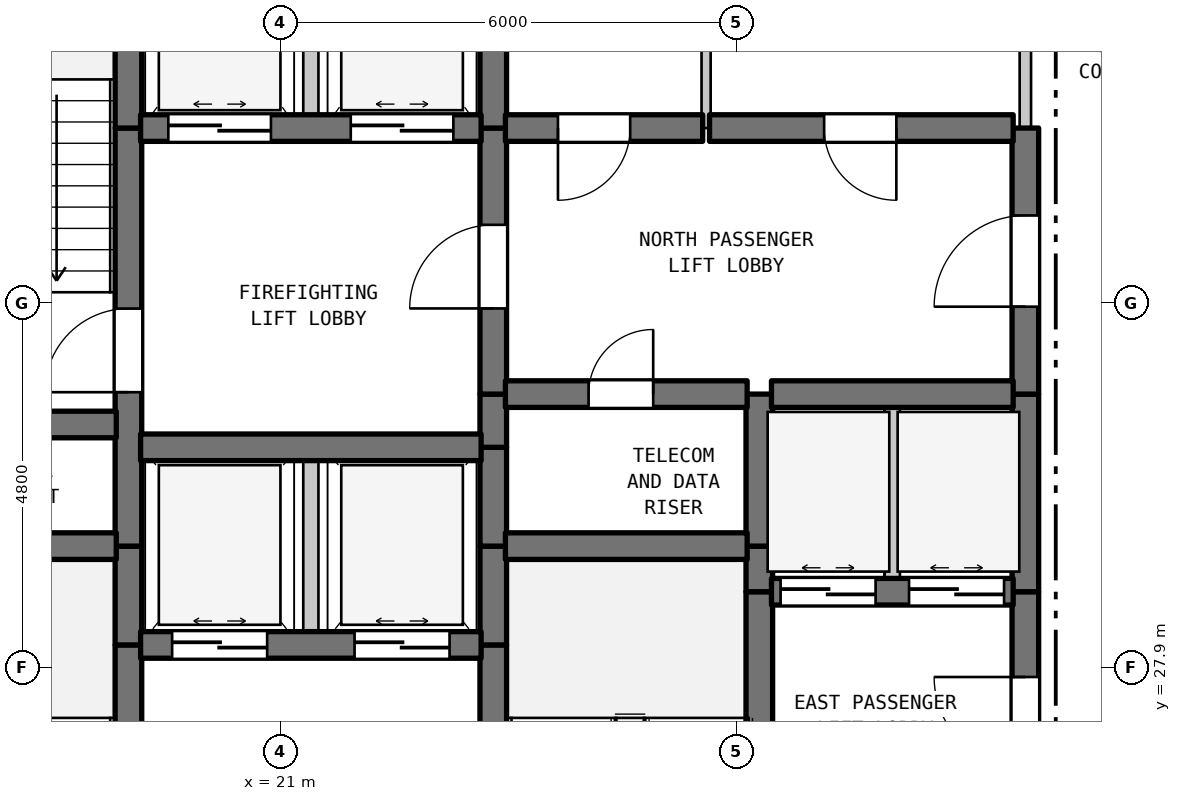
"""IFC4 building model, lengths in metres.
Left out: names, types, materials, properties, quantities, classifications, styles, units other than length and angle.
Written with IfcOpenShell. Run it as: python <this file> out.ifc"""

import sys

from ifc_helpers import new_model, si_unit, direction, frame, frame_2d, origin, place, context, subcontext, project, spatial, rectangle, extrude, element, fill, save


model = new_model("IFC4")
c1 = context("Model", 3, precision=1e-05, world=origin(), true_north=direction((0.0, 1.0)))
c2 = subcontext(c1, "Body", "Model", "MODEL_VIEW")
j1 = project(units=[si_unit("LENGTHUNIT", "METRE"), si_unit("PLANEANGLEUNIT", "RADIAN")], contexts=[c1])
p1 = place(None, origin())
s1 = spatial("IfcSite", under=j1, at=p1, CompositionType="ELEMENT")
p2 = place(p1, origin())
s2 = spatial("IfcBuilding", under=s1, at=p2, CompositionType="ELEMENT")
p3 = place(p2, frame((0.0, 0.0, 176.5)))
s3 = spatial("IfcBuildingStorey", under=s2, at=p3, CompositionType="ELEMENT", Elevation=176.5)
p4 = place(p3, frame((19.0, 22.7, 0.0), z_axis=(0.0, 0.0, 1.0), x_axis=(0.0, 1.0, 0.0)))
e1 = element("IfcWall", 1, at=p4, inside=s3, PredefinedType="SHEAR", context=c2, shape_type="SweptSolid", body=[
    extrude(rectangle(XDim=5.5, YDim=0.35, at=frame_2d((2.75, 0.0))), origin(), (0.0, 0.0, 1.0), 3.39),
])
p5 = place(p4, frame((0.631, 0.0, 0.0)))
e2 = element("IfcOpeningElement", 2, at=p5, cuts=e1, PredefinedType="OPENING", context=c2, shape_type="SweptSolid", body=[
    extrude(rectangle(XDim=1.1, YDim=2.15, at=frame_2d((0.55, 1.075))), frame((0.0, 0.185, 0.0), z_axis=(0.0, -1.0, 0.0), x_axis=(1.0, 0.0, 0.0)), (0.0, 0.0, 1.0), 0.37),
])
p6 = place(p3, frame((19.0, 28.2, 0.0), z_axis=(0.0, 0.0, 1.0), x_axis=(0.0, 1.0, 0.0)))
e3 = element("IfcWall", 3, at=p6, inside=s3, PredefinedType="SHEAR", context=c2, shape_type="SweptSolid", body=[
    extrude(rectangle(XDim=1.3, YDim=0.35, at=frame_2d((0.65, 0.0))), origin(), (0.0, 0.0, 1.0), 3.39),
])
p7 = place(p3, frame((19.0, 29.5, 0.0), z_axis=(0.0, 0.0, 1.0), x_axis=(0.0, 1.0, 0.0)))
e4 = element("IfcWall", 4, at=p7, inside=s3, PredefinedType="SHEAR", context=c2, shape_type="SweptSolid", body=[
    extrude(rectangle(XDim=5.5, YDim=0.35, at=frame_2d((2.75, 0.0))), origin(), (0.0, 0.0, 1.0), 3.39),
])
p8 = place(p7, frame((2.025, 0.0, 0.0)))
e5 = element("IfcOpeningElement", 5, at=p8, cuts=e4, PredefinedType="OPENING", context=c2, shape_type="SweptSolid", body=[
    extrude(rectangle(XDim=1.1, YDim=2.15, at=frame_2d((0.55, 1.075))), frame((0.0, 0.185, 0.0), z_axis=(0.0, -1.0, 0.0), x_axis=(1.0, 0.0, 0.0)), (0.0, 0.0, 1.0), 0.37),
])
p9 = place(p3, frame((19.0, 35.0, 0.0), z_axis=(0.0, 0.0, 1.0), x_axis=(0.0, 1.0, 0.0)))
e6 = element("IfcWall", 6, at=p9, inside=s3, PredefinedType="SHEAR", context=c2, shape_type="SweptSolid", body=[
    extrude(rectangle(XDim=2.9, YDim=0.35, at=frame_2d((1.45, 0.0))), origin(), (0.0, 0.0, 1.0), 3.39),
])
p10 = place(p3, frame((21.4, 28.2, 0.0), z_axis=(0.0, 0.0, 1.0), x_axis=(0.0, 1.0, 0.0)))
e7 = element("IfcWall", 7, at=p10, inside=s3, PredefinedType="STANDARD", context=c2, shape_type="SweptSolid", body=[
    extrude(rectangle(XDim=2.6, YDim=0.2, at=frame_2d((1.3, 0.0))), origin(), (0.0, 0.0, 1.0), 3.39),
])
p11 = place(p3, frame((21.4, 35.0, 0.0), z_axis=(0.0, 0.0, 1.0), x_axis=(0.0, 1.0, 0.0)))
e8 = element("IfcWall", 8, at=p11, inside=s3, PredefinedType="STANDARD", context=c2, shape_type="SweptSolid", body=[
    extrude(rectangle(XDim=2.9, YDim=0.2, at=frame_2d((1.45, 0.0))), origin(), (0.0, 0.0, 1.0), 3.39),
])
p12 = place(p3, frame((23.8, 22.7, 0.0), z_axis=(0.0, 0.0, 1.0), x_axis=(0.0, 1.0, 0.0)))
e9 = element("IfcWall", 9, at=p12, inside=s3, PredefinedType="SHEAR", context=c2, shape_type="SweptSolid", body=[
    extrude(rectangle(XDim=5.5, YDim=0.35, at=frame_2d((2.75, 0.0))), origin(), (0.0, 0.0, 1.0), 3.39),
])
p13 = place(p12, frame((0.235, 0.0, 0.0)))
e10 = element("IfcOpeningElement", 10, at=p13, cuts=e9, PredefinedType="OPENING", context=c2, shape_type="SweptSolid", body=[
    extrude(rectangle(XDim=1.1, YDim=2.15, at=frame_2d((0.55, 1.075))), frame((0.0, 0.185, 0.0), z_axis=(0.0, -1.0, 0.0), x_axis=(1.0, 0.0, 0.0)), (0.0, 0.0, 1.0), 0.37),
])
for number, where, z_axis, x_axis in (
    (11, (23.8, 28.2, 0.0), (0.0, 0.0, 1.0), (0.0, 1.0, 0.0)),
    (12, (23.8, 29.5, 0.0), (0.0, 0.0, 1.0), (0.0, 1.0, 0.0)),
):
    element("IfcWall", number, at=place(p3, frame(where, z_axis=z_axis, x_axis=x_axis)), inside=s3, PredefinedType="SHEAR", context=c2, shape_type="SweptSolid", body=[
        extrude(rectangle(XDim=1.3, YDim=0.35, at=frame_2d((0.65, 0.0))), origin(), (0.0, 0.0, 1.0), 3.39),
    ])
p14 = place(p3, frame((23.8, 30.8, 0.0), z_axis=(0.0, 0.0, 1.0), x_axis=(0.0, 1.0, 0.0)))
e13 = element("IfcWall", 13, at=p14, inside=s3, PredefinedType="SHEAR", context=c2, shape_type="SweptSolid", body=[
    extrude(rectangle(XDim=0.7, YDim=0.35, at=frame_2d((0.35, 0.0))), origin(), (0.0, 0.0, 1.0), 3.39),
])
p15 = place(p3, frame((23.8, 31.5, 0.0), z_axis=(0.0, 0.0, 1.0), x_axis=(0.0, 1.0, 0.0)))
e14 = element("IfcWall", 14, at=p15, inside=s3, PredefinedType="SHEAR", context=c2, shape_type="SweptSolid", body=[
    extrude(rectangle(XDim=3.5, YDim=0.35, at=frame_2d((1.75, 0.0))), origin(), (0.0, 0.0, 1.0), 3.39),
])
p16 = place(p15, frame((1.127, 0.0, 0.0)))
e15 = element("IfcOpeningElement", 15, at=p16, cuts=e14, PredefinedType="OPENING", context=c2, shape_type="SweptSolid", body=[
    extrude(rectangle(XDim=1.1, YDim=2.15, at=frame_2d((0.55, 1.075))), frame((0.0, 0.185, 0.0), z_axis=(0.0, -1.0, 0.0), x_axis=(1.0, 0.0, 0.0)), (0.0, 0.0, 1.0), 0.37),
])
p17 = place(p3, frame((23.8, 35.0, 0.0), z_axis=(0.0, 0.0, 1.0), x_axis=(0.0, 1.0, 0.0)))
e16 = element("IfcWall", 16, at=p17, inside=s3, PredefinedType="SHEAR", context=c2, shape_type="SweptSolid", body=[
    extrude(rectangle(XDim=2.9, YDim=0.35, at=frame_2d((1.45, 0.0))), origin(), (0.0, 0.0, 1.0), 3.39),
])
p18 = place(p3, frame((26.6, 35.0, 0.0), z_axis=(0.0, 0.0, 1.0), x_axis=(0.0, 1.0, 0.0)))
e17 = element("IfcWall", 17, at=p18, inside=s3, PredefinedType="PARTITIONING", context=c2, shape_type="SweptSolid", body=[
    extrude(rectangle(XDim=2.9, YDim=0.12, at=frame_2d((1.45, 0.0))), origin(), (0.0, 0.0, 1.0), 3.39),
])
p19 = place(p3, frame((27.3, 25.6, 0.0), z_axis=(0.0, 0.0, 1.0), x_axis=(0.0, 1.0, 0.0)))
e18 = element("IfcWall", 18, at=p19, inside=s3, PredefinedType="SHEAR", context=c2, shape_type="SweptSolid", body=[
    extrude(rectangle(XDim=3.3, YDim=0.35, at=frame_2d((1.65, 0.0))), origin(), (0.0, 0.0, 1.0), 3.39),
])
p20 = place(p3, frame((27.3, 28.9, 0.0), z_axis=(0.0, 0.0, 1.0), x_axis=(0.0, 1.0, 0.0)))
e19 = element("IfcWall", 19, at=p20, inside=s3, PredefinedType="SHEAR", context=c2, shape_type="SweptSolid", body=[
    extrude(rectangle(XDim=0.6, YDim=0.35, at=frame_2d((0.3, 0.0))), origin(), (0.0, 0.0, 1.0), 3.39),
])
p21 = place(p3, frame((27.3, 29.5, 0.0), z_axis=(0.0, 0.0, 1.0), x_axis=(0.0, 1.0, 0.0)))
e20 = element("IfcWall", 20, at=p21, inside=s3, PredefinedType="SHEAR", context=c2, shape_type="SweptSolid", body=[
    extrude(rectangle(XDim=2.0, YDim=0.35, at=frame_2d((1.0, 0.0))), origin(), (0.0, 0.0, 1.0), 3.39),
])
p22 = place(p3, frame((29.05, 28.9, 0.0), z_axis=(0.0, 0.0, 1.0), x_axis=(0.0, 1.0, 0.0)))
e21 = element("IfcWall", 21, at=p22, inside=s3, PredefinedType="STANDARD", context=c2, shape_type="SweptSolid", body=[
    extrude(rectangle(XDim=2.6, YDim=0.2, at=frame_2d((1.3, 0.0))), origin(), (0.0, 0.0, 1.0), 3.39),
])
p23 = place(p3, frame((30.8, 25.6, 0.0), z_axis=(0.0, 0.0, 1.0), x_axis=(0.0, 1.0, 0.0)))
e22 = element("IfcWall", 22, at=p23, inside=s3, PredefinedType="SHEAR", context=c2, shape_type="SweptSolid", body=[
    extrude(rectangle(XDim=3.3, YDim=0.35, at=frame_2d((1.65, 0.0))), origin(), (0.0, 0.0, 1.0), 3.39),
])
p24 = place(p23, frame((0.978, 0.0, 0.0)))
e23 = element("IfcOpeningElement", 23, at=p24, cuts=e22, PredefinedType="OPENING", context=c2, shape_type="SweptSolid", body=[
    extrude(rectangle(XDim=1.2, YDim=2.2, at=frame_2d((0.6, 1.1))), frame((0.0, 0.185, 0.0), z_axis=(0.0, -1.0, 0.0), x_axis=(1.0, 0.0, 0.0)), (0.0, 0.0, 1.0), 0.37),
])
p25 = place(p3, frame((30.8, 28.9, 0.0), z_axis=(0.0, 0.0, 1.0), x_axis=(0.0, 1.0, 0.0)))
e24 = element("IfcWall", 24, at=p25, inside=s3, PredefinedType="SHEAR", context=c2, shape_type="SweptSolid", body=[
    extrude(rectangle(XDim=2.6, YDim=0.35, at=frame_2d((1.3, 0.0))), origin(), (0.0, 0.0, 1.0), 3.39),
])
p26 = place(p3, frame((30.8, 31.5, 0.0), z_axis=(0.0, 0.0, 1.0), x_axis=(0.0, 1.0, 0.0)))
e25 = element("IfcWall", 25, at=p26, inside=s3, PredefinedType="SHEAR", context=c2, shape_type="SweptSolid", body=[
    extrude(rectangle(XDim=3.5, YDim=0.35, at=frame_2d((1.75, 0.0))), origin(), (0.0, 0.0, 1.0), 3.39),
])
p27 = place(p26, frame((1.15, 0.0, 0.0)))
e26 = element("IfcOpeningElement", 26, at=p27, cuts=e25, PredefinedType="OPENING", context=c2, shape_type="SweptSolid", body=[
    extrude(rectangle(XDim=1.2, YDim=2.2, at=frame_2d((0.6, 1.1))), frame((0.0, 0.185, 0.0), z_axis=(0.0, -1.0, 0.0), x_axis=(1.0, 0.0, 0.0)), (0.0, 0.0, 1.0), 0.37),
])
p28 = place(p3, frame((30.8, 35.0, 0.0), z_axis=(0.0, 0.0, 1.0), x_axis=(0.0, 1.0, 0.0)))
e27 = element("IfcWall", 27, at=p28, inside=s3, PredefinedType="STANDARD", context=c2, shape_type="SweptSolid", body=[
    extrude(rectangle(XDim=2.9, YDim=0.15, at=frame_2d((1.45, 0.0))), origin(), (0.0, 0.0, 1.0), 3.39),
])
p29 = place(p3, frame((19.16, 28.2, 0.0), z_axis=(0.0, 0.0, 1.0), x_axis=(1.0, 0.0, 0.0)))
e28 = element("IfcWall", 28, at=p29, inside=s3, PredefinedType="SHEAR", context=c2, shape_type="SweptSolid", body=[
    extrude(rectangle(XDim=4.48, YDim=0.35, at=frame_2d((2.24, 0.0))), origin(), (0.0, 0.0, 1.0), 3.39),
])
p30 = place(p29, frame((0.415, 0.0, 0.0)))
e29 = element("IfcOpeningElement", 29, at=p30, cuts=e28, PredefinedType="OPENING", context=c2, shape_type="SweptSolid", body=[
    extrude(rectangle(XDim=1.25, YDim=2.2, at=frame_2d((0.625, 1.1))), frame((0.0, 0.185, 0.0), z_axis=(0.0, -1.0, 0.0), x_axis=(1.0, 0.0, 0.0)), (0.0, 0.0, 1.0), 0.37),
])
p31 = place(p29, frame((2.815, 0.0, 0.0)))
e30 = element("IfcOpeningElement", 30, at=p31, cuts=e28, PredefinedType="OPENING", context=c2, shape_type="SweptSolid", body=[
    extrude(rectangle(XDim=1.25, YDim=2.2, at=frame_2d((0.625, 1.1))), frame((0.0, 0.185, 0.0), z_axis=(0.0, -1.0, 0.0), x_axis=(1.0, 0.0, 0.0)), (0.0, 0.0, 1.0), 0.37),
])
p32 = place(p3, frame((27.46, 28.9, 0.0), z_axis=(0.0, 0.0, 1.0), x_axis=(1.0, 0.0, 0.0)))
e31 = element("IfcWall", 31, at=p32, inside=s3, PredefinedType="SHEAR", context=c2, shape_type="SweptSolid", body=[
    extrude(rectangle(XDim=3.18, YDim=0.35, at=frame_2d((1.59, 0.0))), origin(), (0.0, 0.0, 1.0), 3.39),
])
p33 = place(p32, frame((0.12, 0.0, 0.0)))
e32 = element("IfcOpeningElement", 32, at=p33, cuts=e31, PredefinedType="OPENING", context=c2, shape_type="SweptSolid", body=[
    extrude(rectangle(XDim=1.25, YDim=2.2, at=frame_2d((0.625, 1.1))), frame((0.0, 0.185, 0.0), z_axis=(0.0, -1.0, 0.0), x_axis=(1.0, 0.0, 0.0)), (0.0, 0.0, 1.0), 0.37),
])
p34 = place(p32, frame((1.81, 0.0, 0.0)))
e33 = element("IfcOpeningElement", 33, at=p34, cuts=e31, PredefinedType="OPENING", context=c2, shape_type="SweptSolid", body=[
    extrude(rectangle(XDim=1.25, YDim=2.2, at=frame_2d((0.625, 1.1))), frame((0.0, 0.185, 0.0), z_axis=(0.0, -1.0, 0.0), x_axis=(1.0, 0.0, 0.0)), (0.0, 0.0, 1.0), 0.37),
])
p35 = place(p3, frame((15.16, 29.5, 0.0), z_axis=(0.0, 0.0, 1.0), x_axis=(1.0, 0.0, 0.0)))
e34 = element("IfcWall", 34, at=p35, inside=s3, PredefinedType="SHEAR", context=c2, shape_type="SweptSolid", body=[
    extrude(rectangle(XDim=3.68, YDim=0.35, at=frame_2d((1.84, 0.0))), origin(), (0.0, 0.0, 1.0), 3.39),
])
p36 = place(p3, frame((23.96, 29.5, 0.0), z_axis=(0.0, 0.0, 1.0), x_axis=(1.0, 0.0, 0.0)))
e35 = element("IfcWall", 35, at=p36, inside=s3, PredefinedType="SHEAR", context=c2, shape_type="SweptSolid", body=[
    extrude(rectangle(XDim=3.18, YDim=0.35, at=frame_2d((1.59, 0.0))), origin(), (0.0, 0.0, 1.0), 3.39),
])
p37 = place(p3, frame((19.16, 30.8, 0.0), z_axis=(0.0, 0.0, 1.0), x_axis=(1.0, 0.0, 0.0)))
e36 = element("IfcWall", 36, at=p37, inside=s3, PredefinedType="SHEAR", context=c2, shape_type="SweptSolid", body=[
    extrude(rectangle(XDim=4.48, YDim=0.35, at=frame_2d((2.24, 0.0))), origin(), (0.0, 0.0, 1.0), 3.39),
])
p38 = place(p3, frame((15.16, 31.1, 0.0), z_axis=(0.0, 0.0, 1.0), x_axis=(1.0, 0.0, 0.0)))
e37 = element("IfcWall", 37, at=p38, inside=s3, PredefinedType="SHEAR", context=c2, shape_type="SweptSolid", body=[
    extrude(rectangle(XDim=3.68, YDim=0.35, at=frame_2d((1.84, 0.0))), origin(), (0.0, 0.0, 1.0), 3.39),
])
p39 = place(p3, frame((23.96, 31.5, 0.0), z_axis=(0.0, 0.0, 1.0), x_axis=(1.0, 0.0, 0.0)))
e38 = element("IfcWall", 38, at=p39, inside=s3, PredefinedType="SHEAR", context=c2, shape_type="SweptSolid", body=[
    extrude(rectangle(XDim=3.18, YDim=0.35, at=frame_2d((1.59, 0.0))), origin(), (0.0, 0.0, 1.0), 3.39),
])
p40 = place(p39, frame((1.094, 0.0, 0.0)))
e39 = element("IfcOpeningElement", 39, at=p40, cuts=e38, PredefinedType="OPENING", context=c2, shape_type="SweptSolid", body=[
    extrude(rectangle(XDim=0.85, YDim=2.1, at=frame_2d((0.425, 1.05))), frame((0.0, 0.185, 0.0), z_axis=(0.0, -1.0, 0.0), x_axis=(1.0, 0.0, 0.0)), (0.0, 0.0, 1.0), 0.37),
])
p41 = place(p3, frame((27.46, 31.5, 0.0), z_axis=(0.0, 0.0, 1.0), x_axis=(1.0, 0.0, 0.0)))
e40 = element("IfcWall", 40, at=p41, inside=s3, PredefinedType="SHEAR", context=c2, shape_type="SweptSolid", body=[
    extrude(rectangle(XDim=3.18, YDim=0.35, at=frame_2d((1.59, 0.0))), origin(), (0.0, 0.0, 1.0), 3.39),
])
p42 = place(p3, frame((19.16, 35.0, 0.0), z_axis=(0.0, 0.0, 1.0), x_axis=(1.0, 0.0, 0.0)))
e41 = element("IfcWall", 41, at=p42, inside=s3, PredefinedType="SHEAR", context=c2, shape_type="SweptSolid", body=[
    extrude(rectangle(XDim=4.48, YDim=0.35, at=frame_2d((2.24, 0.0))), origin(), (0.0, 0.0, 1.0), 3.39),
])
p43 = place(p42, frame((0.365, 0.0, 0.0)))
e42 = element("IfcOpeningElement", 42, at=p43, cuts=e41, PredefinedType="OPENING", context=c2, shape_type="SweptSolid", body=[
    extrude(rectangle(XDim=1.35, YDim=2.2, at=frame_2d((0.675, 1.1))), frame((0.0, 0.185, 0.0), z_axis=(0.0, -1.0, 0.0), x_axis=(1.0, 0.0, 0.0)), (0.0, 0.0, 1.0), 0.37),
])
p44 = place(p42, frame((2.765, 0.0, 0.0)))
e43 = element("IfcOpeningElement", 43, at=p44, cuts=e41, PredefinedType="OPENING", context=c2, shape_type="SweptSolid", body=[
    extrude(rectangle(XDim=1.35, YDim=2.2, at=frame_2d((0.675, 1.1))), frame((0.0, 0.185, 0.0), z_axis=(0.0, -1.0, 0.0), x_axis=(1.0, 0.0, 0.0)), (0.0, 0.0, 1.0), 0.37),
])
p45 = place(p3, frame((23.96, 35.0, 0.0), z_axis=(0.0, 0.0, 1.0), x_axis=(1.0, 0.0, 0.0)))
e44 = element("IfcWall", 44, at=p45, inside=s3, PredefinedType="SHEAR", context=c2, shape_type="SweptSolid", body=[
    extrude(rectangle(XDim=2.595, YDim=0.35, at=frame_2d((1.297, 0.0))), origin(), (0.0, 0.0, 1.0), 3.39),
])
p46 = place(p45, frame((0.691, 0.0, 0.0)))
e45 = element("IfcOpeningElement", 45, at=p46, cuts=e44, PredefinedType="OPENING", context=c2, shape_type="SweptSolid", body=[
    extrude(rectangle(XDim=0.95, YDim=2.15, at=frame_2d((0.475, 1.075))), frame((0.0, 0.185, 0.0), z_axis=(0.0, -1.0, 0.0), x_axis=(1.0, 0.0, 0.0)), (0.0, 0.0, 1.0), 0.37),
])
p47 = place(p3, frame((26.645, 35.0, 0.0), z_axis=(0.0, 0.0, 1.0), x_axis=(1.0, 0.0, 0.0)))
e46 = element("IfcWall", 46, at=p47, inside=s3, PredefinedType="SHEAR", context=c2, shape_type="SweptSolid", body=[
    extrude(rectangle(XDim=3.995, YDim=0.35, at=frame_2d((1.998, 0.0))), origin(), (0.0, 0.0, 1.0), 3.39),
])
p48 = place(p47, frame((1.508, 0.0, 0.0)))
e47 = element("IfcOpeningElement", 47, at=p48, cuts=e46, PredefinedType="OPENING", context=c2, shape_type="SweptSolid", body=[
    extrude(rectangle(XDim=0.95, YDim=2.15, at=frame_2d((0.475, 1.075))), frame((0.0, 0.185, 0.0), z_axis=(0.0, -1.0, 0.0), x_axis=(1.0, 0.0, 0.0)), (0.0, 0.0, 1.0), 0.37),
])
p49 = place(p8, origin())
e48 = element("IfcDoor", 48, at=p49, inside=s3, OperationType="SINGLE_SWING_LEFT", PredefinedType="DOOR", context=c2, shape_type="SweptSolid", body=[
    extrude(rectangle(XDim=1.1, YDim=2.15, at=frame_2d((0.55, 1.075))), frame((0.0, 0.025, 0.0), z_axis=(0.0, -1.0, 0.0), x_axis=(1.0, 0.0, 0.0)), (0.0, 0.0, 1.0), 0.05),
])
fill(e5, e48)
p50 = place(p16, origin())
e49 = element("IfcDoor", 49, at=p50, inside=s3, OperationType="SINGLE_SWING_LEFT", PredefinedType="DOOR", context=c2, shape_type="SweptSolid", body=[
    extrude(rectangle(XDim=1.1, YDim=2.15, at=frame_2d((0.55, 1.075))), frame((0.0, 0.025, 0.0), z_axis=(0.0, -1.0, 0.0), x_axis=(1.0, 0.0, 0.0)), (0.0, 0.0, 1.0), 0.05),
])
fill(e15, e49)
p51 = place(p24, origin())
e50 = element("IfcDoor", 50, at=p51, inside=s3, OperationType="SINGLE_SWING_RIGHT", PredefinedType="DOOR", context=c2, shape_type="SweptSolid", body=[
    extrude(rectangle(XDim=1.2, YDim=2.2, at=frame_2d((0.6, 1.1))), frame((0.0, 0.025, 0.0), z_axis=(0.0, -1.0, 0.0), x_axis=(1.0, 0.0, 0.0)), (0.0, 0.0, 1.0), 0.05),
])
fill(e23, e50)
p52 = place(p27, origin())
e51 = element("IfcDoor", 51, at=p52, inside=s3, OperationType="SINGLE_SWING_LEFT", PredefinedType="DOOR", context=c2, shape_type="SweptSolid", body=[
    extrude(rectangle(XDim=1.2, YDim=2.2, at=frame_2d((0.6, 1.1))), frame((0.0, 0.025, 0.0), z_axis=(0.0, -1.0, 0.0), x_axis=(1.0, 0.0, 0.0)), (0.0, 0.0, 1.0), 0.05),
])
fill(e26, e51)
p53 = place(p30, origin())
e52 = element("IfcDoor", 52, at=p53, inside=s3, OperationType="DOUBLE_DOOR_SLIDING", PredefinedType="DOOR", context=c2, shape_type="SweptSolid", body=[
    extrude(rectangle(XDim=1.25, YDim=2.2, at=frame_2d((0.625, 1.1))), frame((0.0, 0.025, 0.0), z_axis=(0.0, -1.0, 0.0), x_axis=(1.0, 0.0, 0.0)), (0.0, 0.0, 1.0), 0.05),
])
fill(e29, e52)
p54 = place(p31, origin())
e53 = element("IfcDoor", 53, at=p54, inside=s3, OperationType="DOUBLE_DOOR_SLIDING", PredefinedType="DOOR", context=c2, shape_type="SweptSolid", body=[
    extrude(rectangle(XDim=1.25, YDim=2.2, at=frame_2d((0.625, 1.1))), frame((0.0, 0.025, 0.0), z_axis=(0.0, -1.0, 0.0), x_axis=(1.0, 0.0, 0.0)), (0.0, 0.0, 1.0), 0.05),
])
fill(e30, e53)
p55 = place(p33, origin())
e54 = element("IfcDoor", 54, at=p55, inside=s3, OperationType="DOUBLE_DOOR_SLIDING", PredefinedType="DOOR", context=c2, shape_type="SweptSolid", body=[
    extrude(rectangle(XDim=1.25, YDim=2.2, at=frame_2d((0.625, 1.1))), frame((0.0, 0.025, 0.0), z_axis=(0.0, -1.0, 0.0), x_axis=(1.0, 0.0, 0.0)), (0.0, 0.0, 1.0), 0.05),
])
fill(e32, e54)
p56 = place(p34, origin())
e55 = element("IfcDoor", 55, at=p56, inside=s3, OperationType="DOUBLE_DOOR_SLIDING", PredefinedType="DOOR", context=c2, shape_type="SweptSolid", body=[
    extrude(rectangle(XDim=1.25, YDim=2.2, at=frame_2d((0.625, 1.1))), frame((0.0, 0.025, 0.0), z_axis=(0.0, -1.0, 0.0), x_axis=(1.0, 0.0, 0.0)), (0.0, 0.0, 1.0), 0.05),
])
fill(e33, e55)
p57 = place(p40, origin())
e56 = element("IfcDoor", 56, at=p57, inside=s3, OperationType="SINGLE_SWING_RIGHT", PredefinedType="DOOR", context=c2, shape_type="SweptSolid", body=[
    extrude(rectangle(XDim=0.85, YDim=2.1, at=frame_2d((0.425, 1.05))), frame((0.0, 0.025, 0.0), z_axis=(0.0, -1.0, 0.0), x_axis=(1.0, 0.0, 0.0)), (0.0, 0.0, 1.0), 0.05),
])
fill(e39, e56)
p58 = place(p43, origin())
e57 = element("IfcDoor", 57, at=p58, inside=s3, OperationType="DOUBLE_DOOR_SLIDING", PredefinedType="DOOR", context=c2, shape_type="SweptSolid", body=[
    extrude(rectangle(XDim=1.35, YDim=2.2, at=frame_2d((0.675, 1.1))), frame((0.0, 0.025, 0.0), z_axis=(0.0, -1.0, 0.0), x_axis=(1.0, 0.0, 0.0)), (0.0, 0.0, 1.0), 0.05),
])
fill(e42, e57)
p59 = place(p44, origin())
e58 = element("IfcDoor", 58, at=p59, inside=s3, OperationType="DOUBLE_DOOR_SLIDING", PredefinedType="DOOR", context=c2, shape_type="SweptSolid", body=[
    extrude(rectangle(XDim=1.35, YDim=2.2, at=frame_2d((0.675, 1.1))), frame((0.0, 0.025, 0.0), z_axis=(0.0, -1.0, 0.0), x_axis=(1.0, 0.0, 0.0)), (0.0, 0.0, 1.0), 0.05),
])
fill(e43, e58)
p60 = place(p46, frame((0.95, 0.0, 0.0), z_axis=(0.0, 0.0, 1.0), x_axis=(-1.0, 0.0, 0.0)))
e59 = element("IfcDoor", 59, at=p60, inside=s3, OperationType="SINGLE_SWING_LEFT", PredefinedType="DOOR", context=c2, shape_type="SweptSolid", body=[
    extrude(rectangle(XDim=0.95, YDim=2.15, at=frame_2d((0.475, 1.075))), frame((0.0, 0.025, 0.0), z_axis=(0.0, -1.0, 0.0), x_axis=(1.0, 0.0, 0.0)), (0.0, 0.0, 1.0), 0.05),
])
fill(e45, e59)
p61 = place(p48, frame((0.95, 0.0, 0.0), z_axis=(0.0, 0.0, 1.0), x_axis=(-1.0, 0.0, 0.0)))
e60 = element("IfcDoor", 60, at=p61, inside=s3, OperationType="SINGLE_SWING_RIGHT", PredefinedType="DOOR", context=c2, shape_type="SweptSolid", body=[
    extrude(rectangle(XDim=0.95, YDim=2.15, at=frame_2d((0.475, 1.075))), frame((0.0, 0.025, 0.0), z_axis=(0.0, -1.0, 0.0), x_axis=(1.0, 0.0, 0.0)), (0.0, 0.0, 1.0), 0.05),
])
fill(e47, e60)
save(model, sys.argv[1])
